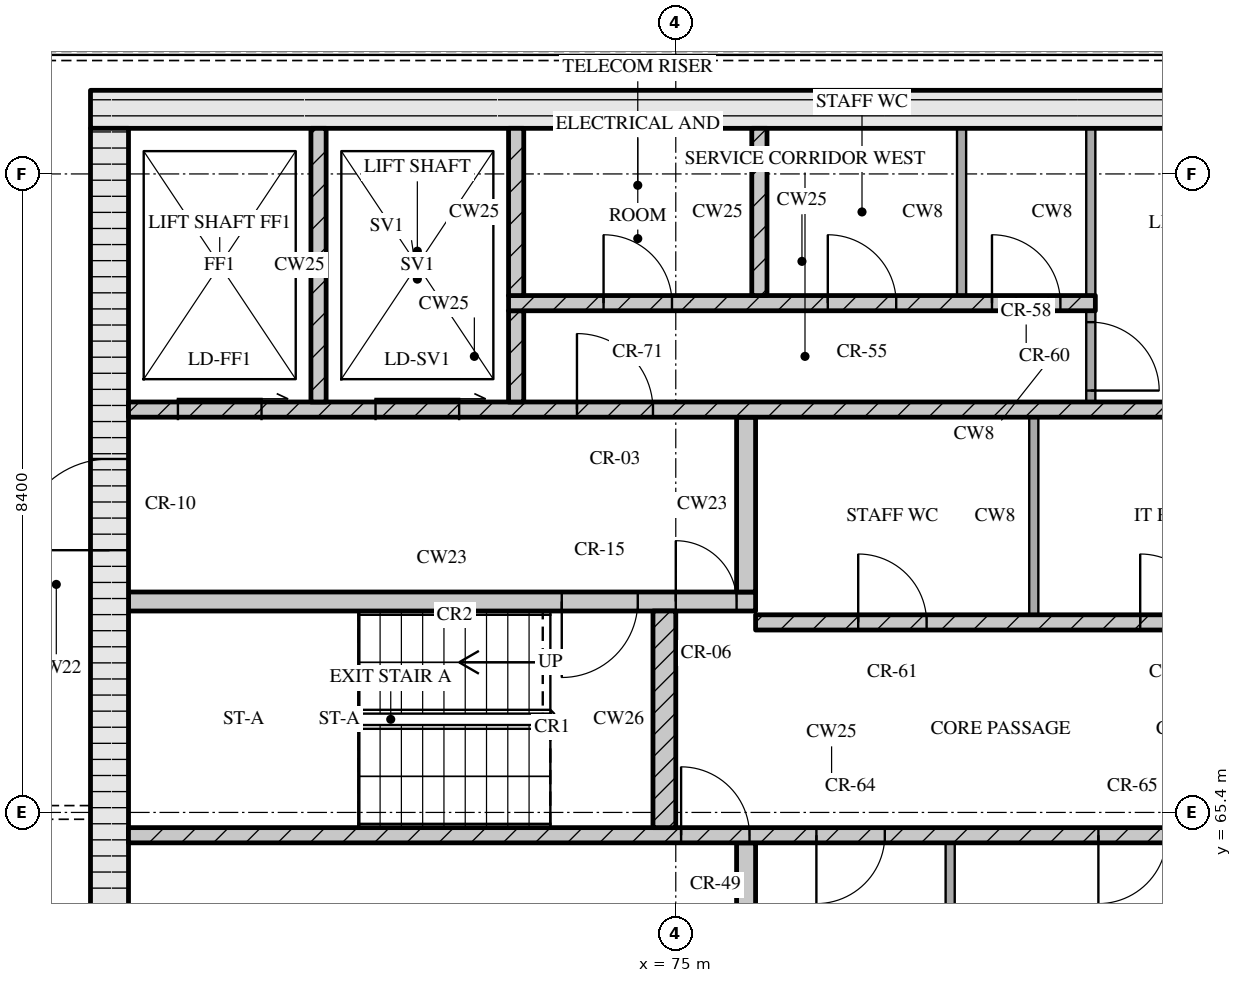
"""IFC4 building model, lengths in metres.
Left out: names, types, materials, properties, quantities, classifications, styles, units other than length and angle.
Written with IfcOpenShell. Run it as: python <this file> out.ifc"""

import sys

from ifc_helpers import new_model, si_unit, direction, frame, frame_2d, origin, place, context, subcontext, project, spatial, rectangle, extrude, element, fill, save


model = new_model("IFC4")
c1 = context("Model", 3, precision=1e-05, world=origin(), true_north=direction((0.0, 1.0)))
c2 = subcontext(c1, "Body", "Model", "MODEL_VIEW")
j1 = project(units=[si_unit("LENGTHUNIT", "METRE"), si_unit("PLANEANGLEUNIT", "RADIAN")], contexts=[c1])
p1 = place(None, origin())
s1 = spatial("IfcSite", under=j1, at=p1, CompositionType="ELEMENT")
p2 = place(p1, origin())
s2 = spatial("IfcBuilding", under=s1, at=p2, CompositionType="ELEMENT")
p3 = place(p2, frame((0.0, 0.0, 281.55)))
s3 = spatial("IfcBuildingStorey", under=s2, at=p3, CompositionType="ELEMENT", Elevation=281.55)
p4 = place(p3, frame((67.3, 74.65, 0.0), z_axis=(0.0, 0.0, 1.0), x_axis=(1.0, 0.0, 0.0)))
e1 = element("IfcWall", 1, at=p4, inside=s3, PredefinedType="SOLIDWALL", context=c2, shape_type="SweptSolid", body=[
    extrude(rectangle(XDim=40.6, YDim=0.5, at=frame_2d((20.3, 0.0))), origin(), (0.0, 0.0, 1.0), 3.32),
])
p5 = place(p3, frame((67.55, 62.4, 0.0), z_axis=(0.0, 0.0, 1.0), x_axis=(0.0, 1.0, 0.0)))
e2 = element("IfcWall", 2, at=p5, inside=s3, PredefinedType="SOLIDWALL", context=c2, shape_type="SweptSolid", body=[
    extrude(rectangle(XDim=12.0, YDim=0.5, at=frame_2d((6.0, 0.0))), origin(), (0.0, 0.0, 1.0), 3.32),
])
p6 = place(p5, frame((6.45, 0.0, 0.0)))
e3 = element("IfcOpeningElement", 3, at=p6, cuts=e2, PredefinedType="OPENING", context=c2, shape_type="SweptSolid", body=[
    extrude(rectangle(XDim=1.2, YDim=2.1, at=frame_2d((0.6, 1.05))), frame((0.0, 0.26, 0.0), z_axis=(0.0, -1.0, 0.0), x_axis=(1.0, 0.0, 0.0)), (0.0, 0.0, 1.0), 0.52),
])
p7 = place(p3, frame((75.925, 62.4, 0.0), z_axis=(0.0, 0.0, 1.0), x_axis=(0.0, 1.0, 0.0)))
e4 = element("IfcWall", 4, at=p7, inside=s3, PredefinedType="SOLIDWALL", context=c2, shape_type="SweptSolid", body=[
    extrude(rectangle(XDim=2.6, YDim=0.25, at=frame_2d((1.3, 0.0))), origin(), (0.0, 0.0, 1.0), 3.32),
])
p8 = place(p3, frame((78.61, 62.4, 0.0), z_axis=(0.0, 0.0, 1.0), x_axis=(0.0, 1.0, 0.0)))
e5 = element("IfcWall", 5, at=p8, inside=s3, PredefinedType="PARTITIONING", context=c2, shape_type="SweptSolid", body=[
    extrude(rectangle(XDim=2.6, YDim=0.12, at=frame_2d((1.3, 0.0))), origin(), (0.0, 0.0, 1.0), 3.32),
])
p9 = place(p3, frame((67.8, 65.1, 0.0), z_axis=(0.0, 0.0, 1.0), x_axis=(1.0, 0.0, 0.0)))
e6 = element("IfcWall", 6, at=p9, inside=s3, PredefinedType="SOLIDWALL", context=c2, shape_type="SweptSolid", body=[
    extrude(rectangle(XDim=18.5, YDim=0.2, at=frame_2d((9.25, 0.0))), origin(), (0.0, 0.0, 1.0), 3.32),
])
p10 = place(p9, frame((7.27, 0.0, 0.0)))
e7 = element("IfcOpeningElement", 7, at=p10, cuts=e6, PredefinedType="OPENING", context=c2, shape_type="SweptSolid", body=[
    extrude(rectangle(XDim=0.9, YDim=2.1, at=frame_2d((0.45, 1.05))), frame((0.0, 0.11, 0.0), z_axis=(0.0, -1.0, 0.0), x_axis=(1.0, 0.0, 0.0)), (0.0, 0.0, 1.0), 0.22),
])
p11 = place(p9, frame((9.05, 0.0, 0.0)))
e8 = element("IfcOpeningElement", 8, at=p11, cuts=e6, PredefinedType="OPENING", context=c2, shape_type="SweptSolid", body=[
    extrude(rectangle(XDim=0.9, YDim=2.1, at=frame_2d((0.45, 1.05))), frame((0.0, 0.11, 0.0), z_axis=(0.0, -1.0, 0.0), x_axis=(1.0, 0.0, 0.0)), (0.0, 0.0, 1.0), 0.22),
])
p12 = place(p9, frame((12.76, 0.0, 0.0)))
e9 = element("IfcOpeningElement", 9, at=p12, cuts=e6, PredefinedType="OPENING", context=c2, shape_type="SweptSolid", body=[
    extrude(rectangle(XDim=0.9, YDim=2.1, at=frame_2d((0.45, 1.05))), frame((0.0, 0.11, 0.0), z_axis=(0.0, -1.0, 0.0), x_axis=(1.0, 0.0, 0.0)), (0.0, 0.0, 1.0), 0.22),
])
p13 = place(p9, frame((16.7, 0.0, 0.0)))
e10 = element("IfcOpeningElement", 10, at=p13, cuts=e6, PredefinedType="OPENING", context=c2, shape_type="SweptSolid", body=[
    extrude(rectangle(XDim=0.9, YDim=2.1, at=frame_2d((0.45, 1.05))), frame((0.0, 0.11, 0.0), z_axis=(0.0, -1.0, 0.0), x_axis=(1.0, 0.0, 0.0)), (0.0, 0.0, 1.0), 0.22),
])
p14 = place(p3, frame((74.85, 65.2, 0.0), z_axis=(0.0, 0.0, 1.0), x_axis=(0.0, 1.0, 0.0)))
e11 = element("IfcWall", 11, at=p14, inside=s3, PredefinedType="SOLIDWALL", context=c2, shape_type="SweptSolid", body=[
    extrude(rectangle(XDim=2.85, YDim=0.3, at=frame_2d((1.425, 0.0))), origin(), (0.0, 0.0, 1.0), 3.32),
])
p15 = place(p3, frame((76.05, 67.9, 0.0), z_axis=(0.0, 0.0, 1.0), x_axis=(1.0, 0.0, 0.0)))
e12 = element("IfcWall", 12, at=p15, inside=s3, PredefinedType="SOLIDWALL", context=c2, shape_type="SweptSolid", body=[
    extrude(rectangle(XDim=23.1, YDim=0.2, at=frame_2d((11.55, 0.0))), origin(), (0.0, 0.0, 1.0), 3.32),
])
p16 = place(p15, frame((1.35, 0.0, 0.0)))
e13 = element("IfcOpeningElement", 13, at=p16, cuts=e12, PredefinedType="OPENING", context=c2, shape_type="SweptSolid", body=[
    extrude(rectangle(XDim=0.9, YDim=2.1, at=frame_2d((0.45, 1.05))), frame((0.0, 0.11, 0.0), z_axis=(0.0, -1.0, 0.0), x_axis=(1.0, 0.0, 0.0)), (0.0, 0.0, 1.0), 0.22),
])
p17 = place(p15, frame((5.06, 0.0, 0.0)))
e14 = element("IfcOpeningElement", 14, at=p17, cuts=e12, PredefinedType="OPENING", context=c2, shape_type="SweptSolid", body=[
    extrude(rectangle(XDim=0.9, YDim=2.1, at=frame_2d((0.45, 1.05))), frame((0.0, 0.11, 0.0), z_axis=(0.0, -1.0, 0.0), x_axis=(1.0, 0.0, 0.0)), (0.0, 0.0, 1.0), 0.22),
])
p18 = place(p15, frame((8.45, 0.0, 0.0)))
e15 = element("IfcOpeningElement", 15, at=p18, cuts=e12, PredefinedType="OPENING", context=c2, shape_type="SweptSolid", body=[
    extrude(rectangle(XDim=0.9, YDim=2.1, at=frame_2d((0.45, 1.05))), frame((0.0, 0.11, 0.0), z_axis=(0.0, -1.0, 0.0), x_axis=(1.0, 0.0, 0.0)), (0.0, 0.0, 1.0), 0.22),
])
p19 = place(p15, frame((10.91, 0.0, 0.0)))
e16 = element("IfcOpeningElement", 16, at=p19, cuts=e12, PredefinedType="OPENING", context=c2, shape_type="SweptSolid", body=[
    extrude(rectangle(XDim=0.9, YDim=2.1, at=frame_2d((0.45, 1.05))), frame((0.0, 0.11, 0.0), z_axis=(0.0, -1.0, 0.0), x_axis=(1.0, 0.0, 0.0)), (0.0, 0.0, 1.0), 0.22),
])
p20 = place(p15, frame((13.55, 0.0, 0.0)))
e17 = element("IfcOpeningElement", 17, at=p20, cuts=e12, PredefinedType="OPENING", context=c2, shape_type="SweptSolid", body=[
    extrude(rectangle(XDim=1.0, YDim=2.1, at=frame_2d((0.5, 1.05))), frame((0.0, 0.11, 0.0), z_axis=(0.0, -1.0, 0.0), x_axis=(1.0, 0.0, 0.0)), (0.0, 0.0, 1.0), 0.22),
])
p21 = place(p15, frame((16.2, 0.0, 0.0)))
e18 = element("IfcOpeningElement", 18, at=p21, cuts=e12, PredefinedType="OPENING", context=c2, shape_type="SweptSolid", body=[
    extrude(rectangle(XDim=1.1, YDim=2.1, at=frame_2d((0.55, 1.05))), frame((0.0, 0.11, 0.0), z_axis=(0.0, -1.0, 0.0), x_axis=(1.0, 0.0, 0.0)), (0.0, 0.0, 1.0), 0.22),
])
p22 = place(p15, frame((18.7, 0.0, 0.0)))
e19 = element("IfcOpeningElement", 19, at=p22, cuts=e12, PredefinedType="OPENING", context=c2, shape_type="SweptSolid", body=[
    extrude(rectangle(XDim=1.1, YDim=2.1, at=frame_2d((0.55, 1.05))), frame((0.0, 0.11, 0.0), z_axis=(0.0, -1.0, 0.0), x_axis=(1.0, 0.0, 0.0)), (0.0, 0.0, 1.0), 0.22),
])
p23 = place(p15, frame((21.2, 0.0, 0.0)))
e20 = element("IfcOpeningElement", 20, at=p23, cuts=e12, PredefinedType="OPENING", context=c2, shape_type="SweptSolid", body=[
    extrude(rectangle(XDim=1.1, YDim=2.1, at=frame_2d((0.55, 1.05))), frame((0.0, 0.11, 0.0), z_axis=(0.0, -1.0, 0.0), x_axis=(1.0, 0.0, 0.0)), (0.0, 0.0, 1.0), 0.22),
])
p24 = place(p3, frame((79.71, 68.0, 0.0), z_axis=(0.0, 0.0, 1.0), x_axis=(0.0, 1.0, 0.0)))
e21 = element("IfcWall", 21, at=p24, inside=s3, PredefinedType="PARTITIONING", context=c2, shape_type="SweptSolid", body=[
    extrude(rectangle(XDim=2.6, YDim=0.12, at=frame_2d((1.3, 0.0))), origin(), (0.0, 0.0, 1.0), 3.32),
])
p25 = place(p3, frame((67.8, 68.175, 0.0), z_axis=(0.0, 0.0, 1.0), x_axis=(1.0, 0.0, 0.0)))
e22 = element("IfcWall", 22, at=p25, inside=s3, PredefinedType="SOLIDWALL", context=c2, shape_type="SweptSolid", body=[
    extrude(rectangle(XDim=8.25, YDim=0.25, at=frame_2d((4.125, 0.0))), origin(), (0.0, 0.0, 1.0), 3.32),
])
p26 = place(p25, frame((5.7, 0.0, 0.0)))
e23 = element("IfcOpeningElement", 23, at=p26, cuts=e22, PredefinedType="OPENING", context=c2, shape_type="SweptSolid", body=[
    extrude(rectangle(XDim=1.0, YDim=2.1, at=frame_2d((0.5, 1.05))), frame((0.0, 0.135, 0.0), z_axis=(0.0, -1.0, 0.0), x_axis=(1.0, 0.0, 0.0)), (0.0, 0.0, 1.0), 0.27),
])
p27 = place(p25, frame((7.2, 0.0, 0.0)))
e24 = element("IfcOpeningElement", 24, at=p27, cuts=e22, PredefinedType="OPENING", context=c2, shape_type="SweptSolid", body=[
    extrude(rectangle(XDim=0.8, YDim=2.1, at=frame_2d((0.4, 1.05))), frame((0.0, 0.135, 0.0), z_axis=(0.0, -1.0, 0.0), x_axis=(1.0, 0.0, 0.0)), (0.0, 0.0, 1.0), 0.27),
])
p28 = place(p3, frame((75.925, 68.3, 0.0), z_axis=(0.0, 0.0, 1.0), x_axis=(0.0, 1.0, 0.0)))
e25 = element("IfcWall", 25, at=p28, inside=s3, PredefinedType="SOLIDWALL", context=c2, shape_type="SweptSolid", body=[
    extrude(rectangle(XDim=2.3, YDim=0.25, at=frame_2d((1.15, 0.0))), origin(), (0.0, 0.0, 1.0), 3.32),
])
p29 = place(p3, frame((67.8, 70.7, 0.0), z_axis=(0.0, 0.0, 1.0), x_axis=(1.0, 0.0, 0.0)))
e26 = element("IfcWall", 26, at=p29, inside=s3, PredefinedType="SOLIDWALL", context=c2, shape_type="SweptSolid", body=[
    extrude(rectangle(XDim=39.6, YDim=0.2, at=frame_2d((19.8, 0.0))), origin(), (0.0, 0.0, 1.0), 3.32),
])
p30 = place(p29, frame((0.65, 0.0, 0.0)))
e27 = element("IfcOpeningElement", 27, at=p30, cuts=e26, PredefinedType="OPENING", context=c2, shape_type="SweptSolid", body=[
    extrude(rectangle(XDim=1.1, YDim=2.1, at=frame_2d((0.55, 1.05))), frame((0.0, 0.11, 0.0), z_axis=(0.0, -1.0, 0.0), x_axis=(1.0, 0.0, 0.0)), (0.0, 0.0, 1.0), 0.22),
])
p31 = place(p29, frame((3.25, 0.0, 0.0)))
e28 = element("IfcOpeningElement", 28, at=p31, cuts=e26, PredefinedType="OPENING", context=c2, shape_type="SweptSolid", body=[
    extrude(rectangle(XDim=1.1, YDim=2.1, at=frame_2d((0.55, 1.05))), frame((0.0, 0.11, 0.0), z_axis=(0.0, -1.0, 0.0), x_axis=(1.0, 0.0, 0.0)), (0.0, 0.0, 1.0), 0.22),
])
p32 = place(p29, frame((5.9, 0.0, 0.0)))
e29 = element("IfcOpeningElement", 29, at=p32, cuts=e26, PredefinedType="OPENING", context=c2, shape_type="SweptSolid", body=[
    extrude(rectangle(XDim=1.0, YDim=2.1, at=frame_2d((0.5, 1.05))), frame((0.0, 0.11, 0.0), z_axis=(0.0, -1.0, 0.0), x_axis=(1.0, 0.0, 0.0)), (0.0, 0.0, 1.0), 0.22),
])
p33 = place(p29, frame((21.7, 0.0, 0.0)))
e30 = element("IfcOpeningElement", 30, at=p33, cuts=e26, PredefinedType="OPENING", context=c2, shape_type="SweptSolid", body=[
    extrude(rectangle(XDim=1.0, YDim=2.1, at=frame_2d((0.5, 1.05))), frame((0.0, 0.11, 0.0), z_axis=(0.0, -1.0, 0.0), x_axis=(1.0, 0.0, 0.0)), (0.0, 0.0, 1.0), 0.22),
])
p34 = place(p29, frame((32.7, 0.0, 0.0)))
e31 = element("IfcOpeningElement", 31, at=p34, cuts=e26, PredefinedType="OPENING", context=c2, shape_type="SweptSolid", body=[
    extrude(rectangle(XDim=1.0, YDim=2.1, at=frame_2d((0.5, 1.05))), frame((0.0, 0.11, 0.0), z_axis=(0.0, -1.0, 0.0), x_axis=(1.0, 0.0, 0.0)), (0.0, 0.0, 1.0), 0.22),
])
p35 = place(p29, frame((35.25, 0.0, 0.0)))
e32 = element("IfcOpeningElement", 32, at=p35, cuts=e26, PredefinedType="OPENING", context=c2, shape_type="SweptSolid", body=[
    extrude(rectangle(XDim=1.1, YDim=2.1, at=frame_2d((0.55, 1.05))), frame((0.0, 0.11, 0.0), z_axis=(0.0, -1.0, 0.0), x_axis=(1.0, 0.0, 0.0)), (0.0, 0.0, 1.0), 0.22),
])
p36 = place(p29, frame((37.85, 0.0, 0.0)))
e33 = element("IfcOpeningElement", 33, at=p36, cuts=e26, PredefinedType="OPENING", context=c2, shape_type="SweptSolid", body=[
    extrude(rectangle(XDim=1.1, YDim=2.1, at=frame_2d((0.55, 1.05))), frame((0.0, 0.11, 0.0), z_axis=(0.0, -1.0, 0.0), x_axis=(1.0, 0.0, 0.0)), (0.0, 0.0, 1.0), 0.22),
])
p37 = place(p3, frame((70.3, 70.8, 0.0), z_axis=(0.0, 0.0, 1.0), x_axis=(0.0, 1.0, 0.0)))
e34 = element("IfcWall", 34, at=p37, inside=s3, PredefinedType="SOLIDWALL", context=c2, shape_type="SweptSolid", body=[
    extrude(rectangle(XDim=3.6, YDim=0.2, at=frame_2d((1.8, 0.0))), origin(), (0.0, 0.0, 1.0), 3.32),
])
p38 = place(p3, frame((72.9, 70.8, 0.0), z_axis=(0.0, 0.0, 1.0), x_axis=(0.0, 1.0, 0.0)))
e35 = element("IfcWall", 35, at=p38, inside=s3, PredefinedType="SOLIDWALL", context=c2, shape_type="SweptSolid", body=[
    extrude(rectangle(XDim=1.2, YDim=0.2, at=frame_2d((0.6, 0.0))), origin(), (0.0, 0.0, 1.0), 3.32),
])
p39 = place(p3, frame((80.46, 70.8, 0.0), z_axis=(0.0, 0.0, 1.0), x_axis=(0.0, 1.0, 0.0)))
e36 = element("IfcWall", 36, at=p39, inside=s3, PredefinedType="PARTITIONING", context=c2, shape_type="SweptSolid", body=[
    extrude(rectangle(XDim=1.2, YDim=0.12, at=frame_2d((0.6, 0.0))), origin(), (0.0, 0.0, 1.0), 3.32),
])
p40 = place(p39, frame((0.15, 0.0, 0.0)))
e37 = element("IfcOpeningElement", 37, at=p40, cuts=e36, PredefinedType="OPENING", context=c2, shape_type="SweptSolid", body=[
    extrude(rectangle(XDim=0.9, YDim=2.1, at=frame_2d((0.45, 1.05))), frame((0.0, 0.07, 0.0), z_axis=(0.0, -1.0, 0.0), x_axis=(1.0, 0.0, 0.0)), (0.0, 0.0, 1.0), 0.14),
])
p41 = place(p3, frame((72.8, 72.1, 0.0), z_axis=(0.0, 0.0, 1.0), x_axis=(1.0, 0.0, 0.0)))
e38 = element("IfcWall", 38, at=p41, inside=s3, PredefinedType="SOLIDWALL", context=c2, shape_type="SweptSolid", body=[
    extrude(rectangle(XDim=7.72, YDim=0.2, at=frame_2d((3.86, 0.0))), origin(), (0.0, 0.0, 1.0), 3.32),
])
p42 = place(p41, frame((1.25, 0.0, 0.0)))
e39 = element("IfcOpeningElement", 39, at=p42, cuts=e38, PredefinedType="OPENING", context=c2, shape_type="SweptSolid", body=[
    extrude(rectangle(XDim=0.9, YDim=2.1, at=frame_2d((0.45, 1.05))), frame((0.0, 0.11, 0.0), z_axis=(0.0, -1.0, 0.0), x_axis=(1.0, 0.0, 0.0)), (0.0, 0.0, 1.0), 0.22),
])
p43 = place(p41, frame((4.2, 0.0, 0.0)))
e40 = element("IfcOpeningElement", 40, at=p43, cuts=e38, PredefinedType="OPENING", context=c2, shape_type="SweptSolid", body=[
    extrude(rectangle(XDim=0.9, YDim=2.1, at=frame_2d((0.45, 1.05))), frame((0.0, 0.11, 0.0), z_axis=(0.0, -1.0, 0.0), x_axis=(1.0, 0.0, 0.0)), (0.0, 0.0, 1.0), 0.22),
])
p44 = place(p41, frame((6.36, 0.0, 0.0)))
e41 = element("IfcOpeningElement", 41, at=p44, cuts=e38, PredefinedType="OPENING", context=c2, shape_type="SweptSolid", body=[
    extrude(rectangle(XDim=0.9, YDim=2.1, at=frame_2d((0.45, 1.05))), frame((0.0, 0.11, 0.0), z_axis=(0.0, -1.0, 0.0), x_axis=(1.0, 0.0, 0.0)), (0.0, 0.0, 1.0), 0.22),
])
for number, where, z_axis, x_axis in (
    (42, (72.9, 72.2, 0.0), (0.0, 0.0, 1.0), (0.0, 1.0, 0.0)),
    (43, (76.1, 72.2, 0.0), (0.0, 0.0, 1.0), (0.0, 1.0, 0.0)),
):
    element("IfcWall", number, at=place(p3, frame(where, z_axis=z_axis, x_axis=x_axis)), inside=s3, PredefinedType="SOLIDWALL", context=c2, shape_type="SweptSolid", body=[
        extrude(rectangle(XDim=2.2, YDim=0.2, at=frame_2d((1.1, 0.0))), origin(), (0.0, 0.0, 1.0), 3.32),
    ])
for number, where, z_axis, x_axis in (
    (44, (78.76, 72.2, 0.0), (0.0, 0.0, 1.0), (0.0, 1.0, 0.0)),
    (45, (80.46, 72.2, 0.0), (0.0, 0.0, 1.0), (0.0, 1.0, 0.0)),
):
    element("IfcWall", number, at=place(p3, frame(where, z_axis=z_axis, x_axis=x_axis)), inside=s3, PredefinedType="PARTITIONING", context=c2, shape_type="SweptSolid", body=[
        extrude(rectangle(XDim=2.2, YDim=0.12, at=frame_2d((1.1, 0.0))), origin(), (0.0, 0.0, 1.0), 3.32),
    ])
p45 = place(p10, origin())
e46 = element("IfcDoor", 46, at=p45, inside=s3, OperationType="SINGLE_SWING_LEFT", PredefinedType="DOOR", context=c2, shape_type="SweptSolid", body=[
    extrude(rectangle(XDim=0.9, YDim=2.1, at=frame_2d((0.45, 1.05))), frame((0.0, 0.025, 0.0), z_axis=(0.0, -1.0, 0.0), x_axis=(1.0, 0.0, 0.0)), (0.0, 0.0, 1.0), 0.05),
])
fill(e7, e46)
p46 = place(p11, origin())
e47 = element("IfcDoor", 47, at=p46, inside=s3, OperationType="SINGLE_SWING_RIGHT", PredefinedType="DOOR", context=c2, shape_type="SweptSolid", body=[
    extrude(rectangle(XDim=0.9, YDim=2.1, at=frame_2d((0.45, 1.05))), frame((0.0, 0.025, 0.0), z_axis=(0.0, -1.0, 0.0), x_axis=(1.0, 0.0, 0.0)), (0.0, 0.0, 1.0), 0.05),
])
fill(e8, e47)
p47 = place(p12, origin())
e48 = element("IfcDoor", 48, at=p47, inside=s3, OperationType="SINGLE_SWING_RIGHT", PredefinedType="DOOR", context=c2, shape_type="SweptSolid", body=[
    extrude(rectangle(XDim=0.9, YDim=2.1, at=frame_2d((0.45, 1.05))), frame((0.0, 0.025, 0.0), z_axis=(0.0, -1.0, 0.0), x_axis=(1.0, 0.0, 0.0)), (0.0, 0.0, 1.0), 0.05),
])
fill(e9, e48)
p48 = place(p16, origin())
e49 = element("IfcDoor", 49, at=p48, inside=s3, OperationType="SINGLE_SWING_LEFT", PredefinedType="DOOR", context=c2, shape_type="SweptSolid", body=[
    extrude(rectangle(XDim=0.9, YDim=2.1, at=frame_2d((0.45, 1.05))), frame((0.0, 0.025, 0.0), z_axis=(0.0, -1.0, 0.0), x_axis=(1.0, 0.0, 0.0)), (0.0, 0.0, 1.0), 0.05),
])
fill(e13, e49)
p49 = place(p17, origin())
e50 = element("IfcDoor", 50, at=p49, inside=s3, OperationType="SINGLE_SWING_LEFT", PredefinedType="DOOR", context=c2, shape_type="SweptSolid", body=[
    extrude(rectangle(XDim=0.9, YDim=2.1, at=frame_2d((0.45, 1.05))), frame((0.0, 0.025, 0.0), z_axis=(0.0, -1.0, 0.0), x_axis=(1.0, 0.0, 0.0)), (0.0, 0.0, 1.0), 0.05),
])
fill(e14, e50)
p50 = place(p26, origin())
e51 = element("IfcDoor", 51, at=p50, inside=s3, OperationType="SINGLE_SWING_RIGHT", PredefinedType="DOOR", context=c2, shape_type="SweptSolid", body=[
    extrude(rectangle(XDim=1.0, YDim=2.1, at=frame_2d((0.5, 1.05))), frame((0.0, 0.025, 0.0), z_axis=(0.0, -1.0, 0.0), x_axis=(1.0, 0.0, 0.0)), (0.0, 0.0, 1.0), 0.05),
])
fill(e23, e51)
p51 = place(p27, origin())
e52 = element("IfcDoor", 52, at=p51, inside=s3, OperationType="SINGLE_SWING_LEFT", PredefinedType="DOOR", context=c2, shape_type="SweptSolid", body=[
    extrude(rectangle(XDim=0.8, YDim=2.1, at=frame_2d((0.4, 1.05))), frame((0.0, 0.025, 0.0), z_axis=(0.0, -1.0, 0.0), x_axis=(1.0, 0.0, 0.0)), (0.0, 0.0, 1.0), 0.05),
])
fill(e24, e52)
p52 = place(p6, origin())
e53 = element("IfcDoor", 53, at=p52, inside=s3, OperationType="SINGLE_SWING_LEFT", PredefinedType="DOOR", context=c2, shape_type="SweptSolid", body=[
    extrude(rectangle(XDim=1.2, YDim=2.1, at=frame_2d((0.6, 1.05))), frame((0.0, 0.025, 0.0), z_axis=(0.0, -1.0, 0.0), x_axis=(1.0, 0.0, 0.0)), (0.0, 0.0, 1.0), 0.05),
])
fill(e3, e53)
p53 = place(p30, origin())
e54 = element("IfcDoor", 54, at=p53, inside=s3, OperationType="SLIDING_TO_RIGHT", PredefinedType="DOOR", context=c2, shape_type="SweptSolid", body=[
    extrude(rectangle(XDim=1.1, YDim=2.1, at=frame_2d((0.55, 1.05))), frame((0.0, 0.025, 0.0), z_axis=(0.0, -1.0, 0.0), x_axis=(1.0, 0.0, 0.0)), (0.0, 0.0, 1.0), 0.05),
])
fill(e27, e54)
p54 = place(p31, origin())
e55 = element("IfcDoor", 55, at=p54, inside=s3, OperationType="SLIDING_TO_RIGHT", PredefinedType="DOOR", context=c2, shape_type="SweptSolid", body=[
    extrude(rectangle(XDim=1.1, YDim=2.1, at=frame_2d((0.55, 1.05))), frame((0.0, 0.025, 0.0), z_axis=(0.0, -1.0, 0.0), x_axis=(1.0, 0.0, 0.0)), (0.0, 0.0, 1.0), 0.05),
])
fill(e28, e55)
p55 = place(p32, origin())
e56 = element("IfcDoor", 56, at=p55, inside=s3, OperationType="SINGLE_SWING_LEFT", PredefinedType="DOOR", context=c2, shape_type="SweptSolid", body=[
    extrude(rectangle(XDim=1.0, YDim=2.1, at=frame_2d((0.5, 1.05))), frame((0.0, 0.025, 0.0), z_axis=(0.0, -1.0, 0.0), x_axis=(1.0, 0.0, 0.0)), (0.0, 0.0, 1.0), 0.05),
])
fill(e29, e56)
p56 = place(p40, origin())
e57 = element("IfcDoor", 57, at=p56, inside=s3, OperationType="SINGLE_SWING_RIGHT", PredefinedType="DOOR", context=c2, shape_type="SweptSolid", body=[
    extrude(rectangle(XDim=0.9, YDim=2.1, at=frame_2d((0.45, 1.05))), frame((0.0, 0.025, 0.0), z_axis=(0.0, -1.0, 0.0), x_axis=(1.0, 0.0, 0.0)), (0.0, 0.0, 1.0), 0.05),
])
fill(e37, e57)
p57 = place(p42, origin())
e58 = element("IfcDoor", 58, at=p57, inside=s3, OperationType="SINGLE_SWING_LEFT", PredefinedType="DOOR", context=c2, shape_type="SweptSolid", body=[
    extrude(rectangle(XDim=0.9, YDim=2.1, at=frame_2d((0.45, 1.05))), frame((0.0, 0.025, 0.0), z_axis=(0.0, -1.0, 0.0), x_axis=(1.0, 0.0, 0.0)), (0.0, 0.0, 1.0), 0.05),
])
fill(e39, e58)
p58 = place(p43, origin())
e59 = element("IfcDoor", 59, at=p58, inside=s3, OperationType="SINGLE_SWING_LEFT", PredefinedType="DOOR", context=c2, shape_type="SweptSolid", body=[
    extrude(rectangle(XDim=0.9, YDim=2.1, at=frame_2d((0.45, 1.05))), frame((0.0, 0.025, 0.0), z_axis=(0.0, -1.0, 0.0), x_axis=(1.0, 0.0, 0.0)), (0.0, 0.0, 1.0), 0.05),
])
fill(e40, e59)
p59 = place(p44, origin())
e60 = element("IfcDoor", 60, at=p59, inside=s3, OperationType="SINGLE_SWING_LEFT", PredefinedType="DOOR", context=c2, shape_type="SweptSolid", body=[
    extrude(rectangle(XDim=0.9, YDim=2.1, at=frame_2d((0.45, 1.05))), frame((0.0, 0.025, 0.0), z_axis=(0.0, -1.0, 0.0), x_axis=(1.0, 0.0, 0.0)), (0.0, 0.0, 1.0), 0.05),
])
fill(e41, e60)
save(model, sys.argv[1])
